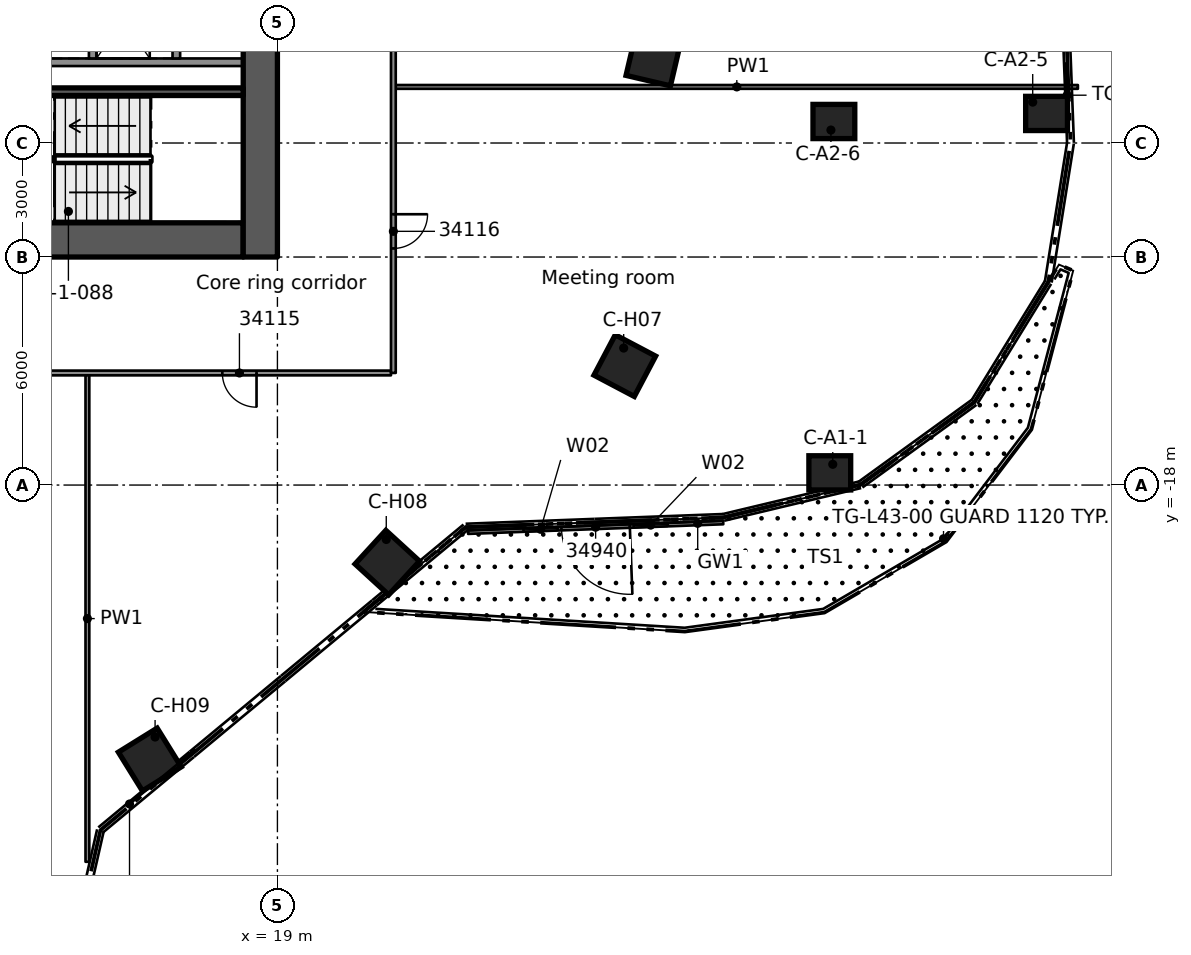
"""IFC4 building model, lengths in metres.
Left out: names, types, materials, properties, quantities, classifications, styles, units other than length and angle.
Written with IfcOpenShell. Run it as: python <this file> out.ifc"""

import sys

from ifc_helpers import new_model, si_unit, direction, frame, frame_2d, origin, origin_2d, place, context, subcontext, project, spatial, rectangle, extrude, element, fill, save


model = new_model("IFC4")
c1 = context("Model", 3, precision=1e-05, world=origin(), true_north=direction((0.0, 1.0)))
c2 = subcontext(c1, "Body", "Model", "MODEL_VIEW")
j1 = project(units=[si_unit("LENGTHUNIT", "METRE"), si_unit("PLANEANGLEUNIT", "RADIAN")], contexts=[c1])
p1 = place(None, origin())
s1 = spatial("IfcSite", under=j1, at=p1, CompositionType="ELEMENT")
p2 = place(p1, origin())
s2 = spatial("IfcBuilding", under=s1, at=p2, CompositionType="ELEMENT")
p3 = place(p2, frame((0.0, 0.0, 167.1)))
s3 = spatial("IfcBuildingStorey", under=s2, at=p3, CompositionType="ELEMENT", Elevation=167.1)
p4 = place(p3, frame((8.9, -11.55, 0.0), z_axis=(0.0, 0.0, 1.0), x_axis=(1.0, 0.0, 0.0)))
e1 = element("IfcWall", 1, at=p4, inside=s3, PredefinedType="SHEAR", context=c2, shape_type="SweptSolid", body=[
    extrude(rectangle(XDim=9.2, YDim=0.9, at=frame_2d((4.6, 0.0))), origin(), (0.0, 0.0, 1.0), 3.5),
])
p5 = place(p4, frame((3.0, 0.0, 0.0)))
e2 = element("IfcOpeningElement", 2, at=p5, cuts=e1, PredefinedType="OPENING", context=c2, shape_type="SweptSolid", body=[
    extrude(rectangle(XDim=1.1, YDim=2.1, at=frame_2d((0.55, 1.05))), frame((0.0, 0.46, 0.0), z_axis=(0.0, -1.0, 0.0), x_axis=(1.0, 0.0, 0.0)), (0.0, 0.0, 1.0), 0.92),
])
p6 = place(p3, frame((18.55, -12.0, 0.0), z_axis=(0.0, 0.0, 1.0), x_axis=(0.0, 1.0, 0.0)))
e3 = element("IfcWall", 3, at=p6, inside=s3, PredefinedType="SHEAR", context=c2, shape_type="SweptSolid", body=[
    extrude(rectangle(XDim=24.0, YDim=0.9, at=frame_2d((12.0, 0.0))), origin(), (0.0, 0.0, 1.0), 3.5),
])
p7 = place(p6, frame((12.1, 0.0, 0.0)))
e4 = element("IfcOpeningElement", 4, at=p7, cuts=e3, PredefinedType="OPENING", context=c2, shape_type="SweptSolid", body=[
    extrude(rectangle(XDim=1.8, YDim=2.1, at=frame_2d((0.9, 1.05))), frame((0.0, 0.46, 0.0), z_axis=(0.0, -1.0, 0.0), x_axis=(1.0, 0.0, 0.0)), (0.0, 0.0, 1.0), 0.92),
])
for number, where, z_axis, x_axis in (
    (5, (33.535, -17.679, 0.0), (0.0, 0.0, 1.0), (1.0, 0.0, 0.0)),
    (6, (39.239, -8.222, 0.0), (0.0, 0.0, 1.0), (1.0, 0.0, 0.0)),
    (7, (33.643, -8.434, 0.0), (0.0, 0.0, 1.0), (1.0, 0.0, 0.0)),
):
    element("IfcColumn", number, at=place(p3, frame(where, z_axis=z_axis, x_axis=x_axis)), inside=s3, PredefinedType="COLUMN", context=c2, shape_type="SweptSolid", body=[
        extrude(rectangle(XDim=1.1, YDim=0.9, at=origin_2d()), origin(), (0.0, 0.0, 1.0), 3.5),
    ])
for number, where, z_axis, x_axis in (
    (8, (28.895, -6.774, 0.0), (0.0, 0.0, 1.0), (0.974, -0.228, 0.0)),
    (9, (28.141, -14.858, 0.0), (0.0, 0.0, 1.0), (0.884, -0.467, 0.0)),
    (10, (21.891, -20.04, 0.0), (0.0, 0.0, 1.0), (0.738, -0.675, 0.0)),
    (11, (15.642, -25.222, 0.0), (0.0, 0.0, 1.0), (0.527, -0.85, 0.0)),
):
    element("IfcColumn", number, at=place(p3, frame(where, z_axis=z_axis, x_axis=x_axis)), inside=s3, PredefinedType="COLUMN", context=c2, shape_type="SweptSolid", body=[
        extrude(rectangle(XDim=1.2, YDim=1.2, at=origin_2d()), origin(), (0.0, 0.0, 1.0), 3.5),
    ])
p8 = place(p3, frame((11.54, -6.875, 0.0), z_axis=(0.0, 0.0, 1.0), x_axis=(1.0, 0.0, 0.0)))
e12 = element("IfcWall", 12, at=p8, inside=s3, PredefinedType="SOLIDWALL", context=c2, shape_type="SweptSolid", body=[
    extrude(rectangle(XDim=6.56, YDim=0.2, at=frame_2d((3.28, 0.0))), origin(), (0.0, 0.0, 1.0), 3.08),
])
p9 = place(p3, frame((14.14, -4.225, 0.0), z_axis=(0.0, 0.0, 1.0), x_axis=(0.0, -1.0, 0.0)))
e13 = element("IfcWall", 13, at=p9, inside=s3, PredefinedType="SOLIDWALL", context=c2, shape_type="SweptSolid", body=[
    extrude(rectangle(XDim=2.55, YDim=0.2, at=frame_2d((1.275, 0.0))), origin(), (0.0, 0.0, 1.0), 3.08),
])
p10 = place(p3, frame((16.34, -4.025, 0.0), z_axis=(0.0, 0.0, 1.0), x_axis=(0.0, -1.0, 0.0)))
e14 = element("IfcWall", 14, at=p10, inside=s3, PredefinedType="SOLIDWALL", context=c2, shape_type="SweptSolid", body=[
    extrude(rectangle(XDim=2.75, YDim=0.2, at=frame_2d((1.375, 0.0))), origin(), (0.0, 0.0, 1.0), 3.08),
])
p11 = place(p10, frame((0.925, 0.0, 0.0)))
e15 = element("IfcOpeningElement", 15, at=p11, cuts=e14, PredefinedType="OPENING", context=c2, shape_type="SweptSolid", body=[
    extrude(rectangle(XDim=1.1, YDim=2.1, at=frame_2d((0.55, 1.05))), frame((0.0, 0.11, 0.0), z_axis=(0.0, -1.0, 0.0), x_axis=(1.0, 0.0, 0.0)), (0.0, 0.0, 1.0), 0.22),
])
p12 = place(p3, frame((11.54, -7.65, 0.0), z_axis=(0.0, 0.0, 1.0), x_axis=(1.0, 0.0, 0.0)))
e16 = element("IfcWall", 16, at=p12, inside=s3, PredefinedType="SOLIDWALL", context=c2, shape_type="SweptSolid", body=[
    extrude(rectangle(XDim=6.56, YDim=0.2, at=frame_2d((3.28, 0.0))), origin(), (0.0, 0.0, 1.0), 3.08),
])
p13 = place(p3, frame((30.731, -18.982, 0.0), z_axis=(0.0, 0.0, 1.0), x_axis=(-0.999287341001, -0.037746656995, 0.0)))
e17 = element("IfcWall", 17, at=p13, inside=s3, PredefinedType="STANDARD", context=c2, shape_type="SweptSolid", body=[
    extrude(rectangle(XDim=6.72, YDim=0.1, at=frame_2d((3.36, 0.0))), origin(), (0.0, 0.0, 1.0), 3.08),
])
p14 = place(p13, frame((2.46, 0.0, 0.0)))
e18 = element("IfcOpeningElement", 18, at=p14, cuts=e17, PredefinedType="OPENING", context=c2, shape_type="SweptSolid", body=[
    extrude(rectangle(XDim=1.8, YDim=2.4, at=frame_2d((0.9, 1.2))), frame((0.0, 0.06, 0.0), z_axis=(0.0, -1.0, 0.0), x_axis=(1.0, 0.0, 0.0)), (0.0, 0.0, 1.0), 0.12),
])
p15 = place(p13, frame((1.46, 0.0, 0.0)))
e19 = element("IfcOpeningElement", 19, at=p15, cuts=e17, PredefinedType="OPENING", context=c2, shape_type="SweptSolid", body=[
    extrude(rectangle(XDim=0.9, YDim=2.4, at=frame_2d((0.45, 1.2))), frame((0.0, 0.06, 0.0), z_axis=(0.0, -1.0, 0.0), x_axis=(1.0, 0.0, 0.0)), (0.0, 0.0, 1.0), 0.12),
])
p16 = place(p13, frame((4.36, 0.0, 0.0)))
e20 = element("IfcOpeningElement", 20, at=p16, cuts=e17, PredefinedType="OPENING", context=c2, shape_type="SweptSolid", body=[
    extrude(rectangle(XDim=0.9, YDim=2.4, at=frame_2d((0.45, 1.2))), frame((0.0, 0.06, 0.0), z_axis=(0.0, -1.0, 0.0), x_axis=(1.0, 0.0, 0.0)), (0.0, 0.0, 1.0), 0.12),
])
p17 = place(p3, frame((21.988, -15.051, 0.0), z_axis=(0.0, 0.0, 1.0), x_axis=(-1.0, 0.0, 0.0)))
e21 = element("IfcWall", 21, at=p17, inside=s3, PredefinedType="PARTITIONING", context=c2, shape_type="SweptSolid", body=[
    extrude(rectangle(XDim=10.997, YDim=0.125, at=frame_2d((5.499, 0.0))), origin(), (0.0, 0.0, 1.0), 3.06),
])
p18 = place(p17, frame((3.538, 0.0, 0.0)))
e22 = element("IfcOpeningElement", 22, at=p18, cuts=e21, PredefinedType="OPENING", context=c2, shape_type="SweptSolid", body=[
    extrude(rectangle(XDim=0.9, YDim=2.1, at=frame_2d((0.45, 1.05))), frame((0.0, 0.073, 0.0), z_axis=(0.0, -1.0, 0.0), x_axis=(1.0, 0.0, 0.0)), (0.0, 0.0, 1.0), 0.145),
])
p19 = place(p3, frame((22.113, -7.524, 0.0), z_axis=(0.0, 0.0, 1.0), x_axis=(1.0, 0.0, 0.0)))
e23 = element("IfcWall", 23, at=p19, inside=s3, PredefinedType="PARTITIONING", context=c2, shape_type="SweptSolid", body=[
    extrude(rectangle(XDim=17.951, YDim=0.1, at=frame_2d((8.976, 0.0))), origin(), (0.0, 0.0, 1.0), 3.06),
])
p20 = place(p3, frame((22.051, 15.05, 0.0), z_axis=(0.0, 0.0, 1.0), x_axis=(0.0, -1.0, 0.0)))
e24 = element("IfcWall", 24, at=p20, inside=s3, PredefinedType="PARTITIONING", context=c2, shape_type="SweptSolid", body=[
    extrude(rectangle(XDim=30.1, YDim=0.125, at=frame_2d((15.05, 0.0))), origin(), (0.0, 0.0, 1.0), 3.06),
])
p21 = place(p20, frame((25.924, 0.0, 0.0)))
e25 = element("IfcOpeningElement", 25, at=p21, cuts=e24, PredefinedType="OPENING", context=c2, shape_type="SweptSolid", body=[
    extrude(rectangle(XDim=0.9, YDim=2.1, at=frame_2d((0.45, 1.05))), frame((0.0, 0.073, 0.0), z_axis=(0.0, -1.0, 0.0), x_axis=(1.0, 0.0, 0.0)), (0.0, 0.0, 1.0), 0.145),
])
p22 = place(p20, frame((17.9, 0.0, 0.0)))
e26 = element("IfcOpeningElement", 26, at=p22, cuts=e24, PredefinedType="OPENING", context=c2, shape_type="SweptSolid", body=[
    extrude(rectangle(XDim=1.8, YDim=2.1, at=frame_2d((0.9, 1.05))), frame((0.0, 0.073, 0.0), z_axis=(0.0, -1.0, 0.0), x_axis=(1.0, 0.0, 0.0)), (0.0, 0.0, 1.0), 0.145),
])
p23 = place(p20, frame((10.876, 0.0, 0.0)))
e27 = element("IfcOpeningElement", 27, at=p23, cuts=e24, PredefinedType="OPENING", context=c2, shape_type="SweptSolid", body=[
    extrude(rectangle(XDim=0.9, YDim=2.1, at=frame_2d((0.45, 1.05))), frame((0.0, 0.073, 0.0), z_axis=(0.0, -1.0, 0.0), x_axis=(1.0, 0.0, 0.0)), (0.0, 0.0, 1.0), 0.145),
])
p24 = place(p20, frame((2.85, 0.0, 0.0)))
e28 = element("IfcOpeningElement", 28, at=p24, cuts=e24, PredefinedType="OPENING", context=c2, shape_type="SweptSolid", body=[
    extrude(rectangle(XDim=1.8, YDim=2.1, at=frame_2d((0.9, 1.05))), frame((0.0, 0.073, 0.0), z_axis=(0.0, -1.0, 0.0), x_axis=(1.0, 0.0, 0.0)), (0.0, 0.0, 1.0), 0.145),
])
p25 = place(p3, frame((14.0, -27.913, 0.0), z_axis=(0.0, 0.0, 1.0), x_axis=(0.0, 1.0, 0.0)))
e29 = element("IfcWall", 29, at=p25, inside=s3, PredefinedType="PARTITIONING", context=c2, shape_type="SweptSolid", body=[
    extrude(rectangle(XDim=12.799, YDim=0.1, at=frame_2d((6.399, 0.0))), origin(), (0.0, 0.0, 1.0), 3.06),
])
p26 = place(p14, origin())
e30 = element("IfcDoor", 30, at=p26, inside=s3, OperationType="DOUBLE_DOOR_SINGLE_SWING", PredefinedType="DOOR", context=c2, shape_type="SweptSolid", body=[
    extrude(rectangle(XDim=1.8, YDim=2.4, at=frame_2d((0.9, 1.2))), frame((0.0, 0.025, 0.0), z_axis=(0.0, -1.0, 0.0), x_axis=(1.0, 0.0, 0.0)), (0.0, 0.0, 1.0), 0.05),
])
fill(e18, e30)
p27 = place(p15, origin())
e31 = element("IfcWindow", 31, at=p27, inside=s3, PartitioningType="SINGLE_PANEL", PredefinedType="WINDOW", context=c2, shape_type="SweptSolid", body=[
    extrude(rectangle(XDim=0.9, YDim=2.4, at=frame_2d((0.45, 1.2))), frame((0.0, 0.03, 0.0), z_axis=(0.0, -1.0, 0.0), x_axis=(1.0, 0.0, 0.0)), (0.0, 0.0, 1.0), 0.06),
])
fill(e19, e31)
p28 = place(p16, origin())
e32 = element("IfcWindow", 32, at=p28, inside=s3, PartitioningType="SINGLE_PANEL", PredefinedType="WINDOW", context=c2, shape_type="SweptSolid", body=[
    extrude(rectangle(XDim=0.9, YDim=2.4, at=frame_2d((0.45, 1.2))), frame((0.0, 0.03, 0.0), z_axis=(0.0, -1.0, 0.0), x_axis=(1.0, 0.0, 0.0)), (0.0, 0.0, 1.0), 0.06),
])
fill(e20, e32)
p29 = place(p18, origin())
e33 = element("IfcDoor", 33, at=p29, inside=s3, OperationType="SINGLE_SWING_LEFT", PredefinedType="DOOR", context=c2, shape_type="SweptSolid", body=[
    extrude(rectangle(XDim=0.9, YDim=2.1, at=frame_2d((0.45, 1.05))), frame((0.0, 0.025, 0.0), z_axis=(0.0, -1.0, 0.0), x_axis=(1.0, 0.0, 0.0)), (0.0, 0.0, 1.0), 0.05),
])
fill(e22, e33)
p30 = place(p21, origin())
e34 = element("IfcDoor", 34, at=p30, inside=s3, OperationType="SINGLE_SWING_RIGHT", PredefinedType="DOOR", context=c2, shape_type="SweptSolid", body=[
    extrude(rectangle(XDim=0.9, YDim=2.1, at=frame_2d((0.45, 1.05))), frame((0.0, 0.025, 0.0), z_axis=(0.0, -1.0, 0.0), x_axis=(1.0, 0.0, 0.0)), (0.0, 0.0, 1.0), 0.05),
])
fill(e25, e34)
save(model, sys.argv[1])
